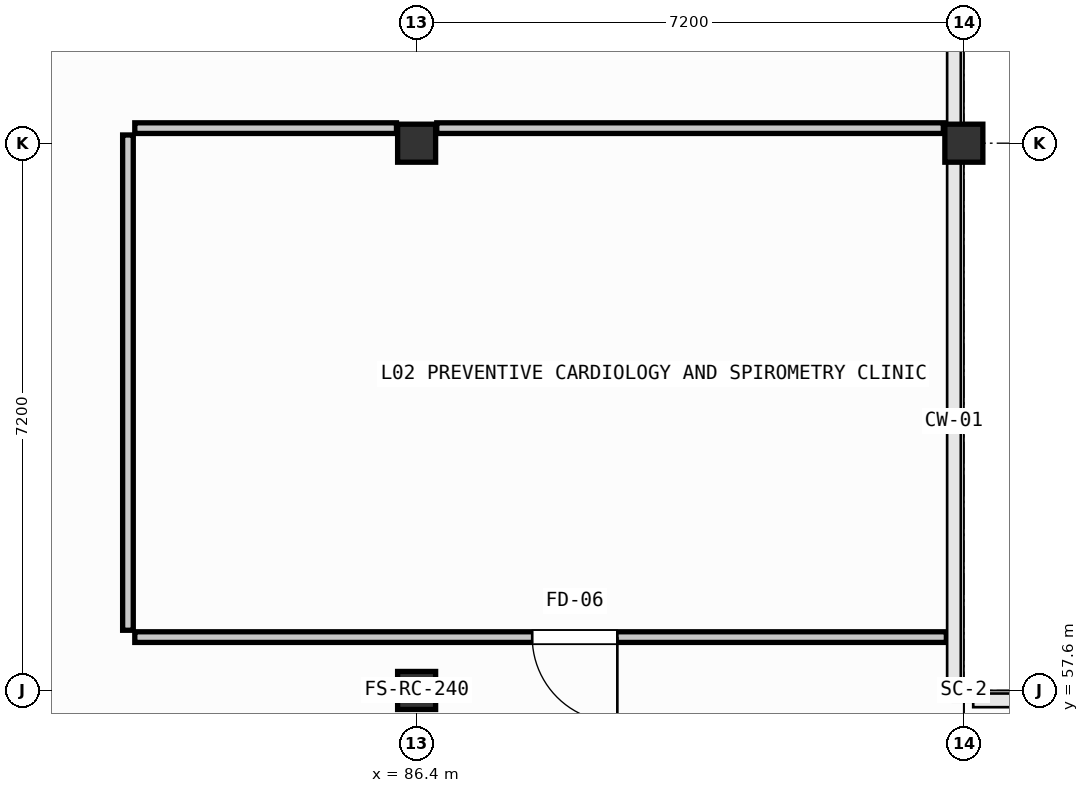
"""IFC4 building model, lengths in metres.
Left out: names, types, materials, properties, quantities, classifications, styles, units other than length and angle.
Written with IfcOpenShell. Run it as: python <this file> out.ifc"""

import sys

from ifc_helpers import new_model, si_unit, direction, frame, frame_2d, origin, origin_2d, place, context, subcontext, project, spatial, rectangle, i_section, extrude, element, fill, save


model = new_model("IFC4")
c1 = context("Model", 3, precision=1e-05, world=origin(), true_north=direction((0.0, 1.0)))
c2 = subcontext(c1, "Body", "Model", "MODEL_VIEW")
j1 = project(units=[si_unit("LENGTHUNIT", "METRE"), si_unit("PLANEANGLEUNIT", "RADIAN")], contexts=[c1])
p1 = place(None, origin())
s1 = spatial("IfcSite", under=j1, at=p1, CompositionType="ELEMENT")
p2 = place(p1, origin())
s2 = spatial("IfcBuilding", under=s1, at=p2, CompositionType="ELEMENT")
p3 = place(p2, frame((0.0, 0.0, 4.8)))
s3 = spatial("IfcBuildingStorey", under=s2, at=p3, CompositionType="ELEMENT", Elevation=4.8)
for number, where, z_axis, x_axis in (
    (1, (86.4, 57.6, 0.0), (0.0, 0.0, 1.0), (1.0, 0.0, 0.0)),
    (2, (86.4, 64.8, 0.0), (0.0, 0.0, 1.0), (1.0, 0.0, 0.0)),
):
    element("IfcColumn", number, at=place(p3, frame(where, z_axis=z_axis, x_axis=x_axis)), inside=s3, PredefinedType="COLUMN", context=c2, shape_type="SweptSolid", body=[
        extrude(rectangle(XDim=0.5, YDim=0.5, at=origin_2d()), origin(), (0.0, 0.0, 1.0), 4.55),
    ])
p4 = place(p3, frame((93.6, 57.6, 0.0), z_axis=(0.0, 0.0, 1.0), x_axis=(1.0, 0.0, 0.0)))
e3 = element("IfcColumn", 3, at=p4, inside=s3, PredefinedType="COLUMN", context=c2, shape_type="SweptSolid", body=[
    extrude(i_section(OverallWidth=0.256, OverallDepth=0.26, WebThickness=0.01, FlangeThickness=0.017, FilletRadius=0.013, at=origin_2d()), origin(), (0.0, 0.0, 1.0), 4.55),
])
p5 = place(p3, frame((93.6, 64.8, 0.0), z_axis=(0.0, 0.0, 1.0), x_axis=(1.0, 0.0, 0.0)))
e4 = element("IfcColumn", 4, at=p5, inside=s3, PredefinedType="COLUMN", context=c2, shape_type="SweptSolid", body=[
    extrude(rectangle(XDim=0.5, YDim=0.5, at=origin_2d()), origin(), (0.0, 0.0, 1.0), 4.55),
])
p6 = place(p3, frame((93.37, 58.302, 0.0), z_axis=(0.0, 0.0, 1.0), x_axis=(-1.0, 0.0, 0.0)))
e5 = element("IfcWall", 5, at=p6, inside=s3, PredefinedType="PARTITIONING", context=c2, shape_type="SweptSolid", body=[
    extrude(rectangle(XDim=10.678, YDim=0.14, at=frame_2d((5.339, 0.0))), origin(), (0.0, 0.0, 1.0), 3.85),
])
p7 = place(p6, frame((4.329, 0.0, 0.0)))
e6 = element("IfcOpeningElement", 6, at=p7, cuts=e5, PredefinedType="OPENING", context=c2, shape_type="SweptSolid", body=[
    extrude(rectangle(XDim=1.12, YDim=2.14, at=frame_2d((0.56, 1.07))), frame((0.0, 0.08, 0.0), z_axis=(0.0, -1.0, 0.0), x_axis=(1.0, 0.0, 0.0)), (0.0, 0.0, 1.0), 0.16),
])
p8 = place(p3, frame((82.602, 58.392, 0.0), z_axis=(0.0, 0.0, 1.0), x_axis=(0.0, 1.0, 0.0)))
e7 = element("IfcWall", 7, at=p8, inside=s3, PredefinedType="PARTITIONING", context=c2, shape_type="SweptSolid", body=[
    extrude(rectangle(XDim=6.516, YDim=0.14, at=frame_2d((3.258, 0.0))), origin(), (0.0, 0.0, 1.0), 3.75),
])
p9 = place(p3, frame((82.692, 64.998, 0.0), z_axis=(0.0, 0.0, 1.0), x_axis=(1.0, 0.0, 0.0)))
e8 = element("IfcWall", 8, at=p9, inside=s3, PredefinedType="PARTITIONING", context=c2, shape_type="SweptSolid", body=[
    extrude(rectangle(XDim=3.443, YDim=0.14, at=frame_2d((1.722, 0.0))), origin(), (0.0, 0.0, 1.0), 3.75),
])
p10 = place(p3, frame((86.665, 64.998, 0.0), z_axis=(0.0, 0.0, 1.0), x_axis=(1.0, 0.0, 0.0)))
e9 = element("IfcWall", 9, at=p10, inside=s3, PredefinedType="PARTITIONING", context=c2, shape_type="SweptSolid", body=[
    extrude(rectangle(XDim=6.665, YDim=0.14, at=frame_2d((3.333, 0.0))), origin(), (0.0, 0.0, 1.0), 3.75),
])
p11 = place(p7, origin())
e10 = element("IfcDoor", 10, at=p11, inside=s3, OperationType="SINGLE_SWING_RIGHT", PredefinedType="DOOR", context=c2, shape_type="SweptSolid", body=[
    extrude(rectangle(XDim=1.12, YDim=2.14, at=frame_2d((0.56, 1.07))), frame((0.0, 0.025, 0.0), z_axis=(0.0, -1.0, 0.0), x_axis=(1.0, 0.0, 0.0)), (0.0, 0.0, 1.0), 0.05),
])
fill(e6, e10)
save(model, sys.argv[1])
